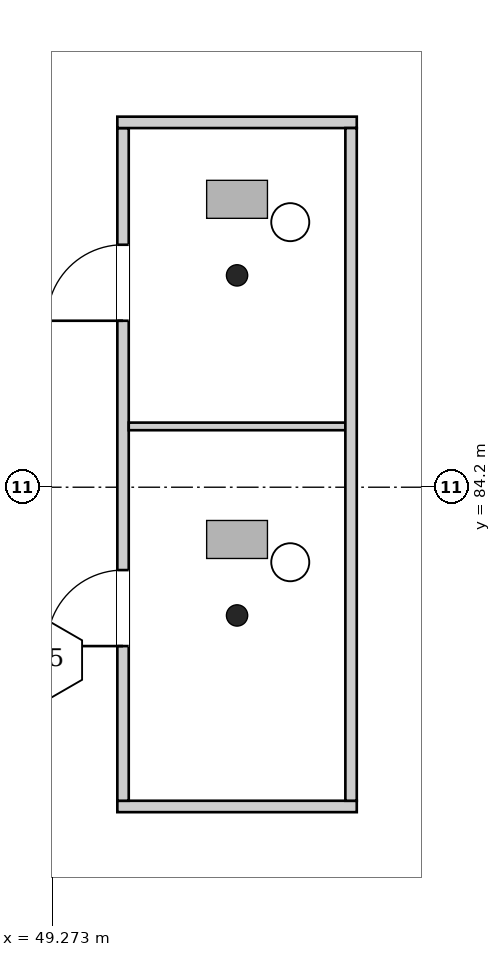
"""IFC4 building model, lengths in metres.
Left out: names, types, materials, properties, quantities, classifications, styles, units other than length and angle.
Written with IfcOpenShell. Run it as: python <this file> out.ifc"""

import sys

from ifc_helpers import new_model, si_unit, direction, frame, frame_2d, origin, place, context, subcontext, project, spatial, rectangle, extrude, element, fill, save


model = new_model("IFC4")
c1 = context("Model", 3, precision=1e-05, world=origin(), true_north=direction((0.0, 1.0)))
c2 = subcontext(c1, "Body", "Model", "MODEL_VIEW")
j1 = project(units=[si_unit("LENGTHUNIT", "METRE"), si_unit("PLANEANGLEUNIT", "RADIAN")], contexts=[c1])
p1 = place(None, origin())
s1 = spatial("IfcSite", under=j1, at=p1, CompositionType="ELEMENT")
p2 = place(p1, origin())
s2 = spatial("IfcBuilding", under=s1, at=p2, CompositionType="ELEMENT")
p3 = place(p2, frame((0.0, 0.0, 26.7)))
s3 = spatial("IfcBuildingStorey", under=s2, at=p3, CompositionType="ELEMENT", Elevation=26.7)
p4 = place(p3, frame((50.125, 80.0, 0.0), z_axis=(0.0, 0.0, 1.0), x_axis=(1.0, 0.0, 0.0)))
e1 = element("IfcWall", 1, at=p4, inside=s3, PredefinedType="PARTITIONING", context=c2, shape_type="SweptSolid", body=[
    extrude(rectangle(XDim=3.15, YDim=0.15, at=frame_2d((1.575, 0.0))), origin(), (0.0, 0.0, 1.0), 4.85),
])
p5 = place(p3, frame((50.2, 80.075, 0.0), z_axis=(0.0, 0.0, 1.0), x_axis=(0.0, 1.0, 0.0)))
e2 = element("IfcWall", 2, at=p5, inside=s3, PredefinedType="PARTITIONING", context=c2, shape_type="SweptSolid", body=[
    extrude(rectangle(XDim=8.85, YDim=0.15, at=frame_2d((4.425, 0.0))), origin(), (0.0, 0.0, 1.0), 4.85),
])
p6 = place(p5, frame((2.035, 0.0, 0.0)))
e3 = element("IfcOpeningElement", 3, at=p6, cuts=e2, PredefinedType="OPENING", context=c2, shape_type="SweptSolid", body=[
    extrude(rectangle(XDim=1.0, YDim=2.1, at=frame_2d((0.5, 1.05))), frame((0.0, 0.085, 0.0), z_axis=(0.0, -1.0, 0.0), x_axis=(1.0, 0.0, 0.0)), (0.0, 0.0, 1.0), 0.17),
])
p7 = place(p5, frame((6.315, 0.0, 0.0)))
e4 = element("IfcOpeningElement", 4, at=p7, cuts=e2, PredefinedType="OPENING", context=c2, shape_type="SweptSolid", body=[
    extrude(rectangle(XDim=1.0, YDim=2.1, at=frame_2d((0.5, 1.05))), frame((0.0, 0.085, 0.0), z_axis=(0.0, -1.0, 0.0), x_axis=(1.0, 0.0, 0.0)), (0.0, 0.0, 1.0), 0.17),
])
p8 = place(p3, frame((50.125, 89.0, 0.0), z_axis=(0.0, 0.0, 1.0), x_axis=(1.0, 0.0, 0.0)))
e5 = element("IfcWall", 5, at=p8, inside=s3, PredefinedType="PARTITIONING", context=c2, shape_type="SweptSolid", body=[
    extrude(rectangle(XDim=3.15, YDim=0.15, at=frame_2d((1.575, 0.0))), origin(), (0.0, 0.0, 1.0), 4.85),
])
p9 = place(p3, frame((50.275, 85.0, 0.0), z_axis=(0.0, 0.0, 1.0), x_axis=(1.0, 0.0, 0.0)))
e6 = element("IfcWall", 6, at=p9, inside=s3, PredefinedType="PARTITIONING", context=c2, shape_type="SweptSolid", body=[
    extrude(rectangle(XDim=2.85, YDim=0.1, at=frame_2d((1.425, 0.0))), origin(), (0.0, 0.0, 1.0), 4.85),
])
p10 = place(p3, frame((53.2, 80.075, 0.0), z_axis=(0.0, 0.0, 1.0), x_axis=(0.0, 1.0, 0.0)))
e7 = element("IfcWall", 7, at=p10, inside=s3, PredefinedType="PARTITIONING", context=c2, shape_type="SweptSolid", body=[
    extrude(rectangle(XDim=8.85, YDim=0.15, at=frame_2d((4.425, 0.0))), origin(), (0.0, 0.0, 1.0), 4.85),
])
p11 = place(p6, origin())
e8 = element("IfcDoor", 8, at=p11, inside=s3, OperationType="SINGLE_SWING_RIGHT", PredefinedType="DOOR", context=c2, shape_type="SweptSolid", body=[
    extrude(rectangle(XDim=1.0, YDim=2.1, at=frame_2d((0.5, 1.05))), frame((0.0, 0.025, 0.0), z_axis=(0.0, -1.0, 0.0), x_axis=(1.0, 0.0, 0.0)), (0.0, 0.0, 1.0), 0.05),
])
fill(e3, e8)
p12 = place(p7, origin())
e9 = element("IfcDoor", 9, at=p12, inside=s3, OperationType="SINGLE_SWING_LEFT", PredefinedType="DOOR", context=c2, shape_type="SweptSolid", body=[
    extrude(rectangle(XDim=1.0, YDim=2.1, at=frame_2d((0.5, 1.05))), frame((0.0, 0.025, 0.0), z_axis=(0.0, -1.0, 0.0), x_axis=(1.0, 0.0, 0.0)), (0.0, 0.0, 1.0), 0.05),
])
fill(e4, e9)
save(model, sys.argv[1])
